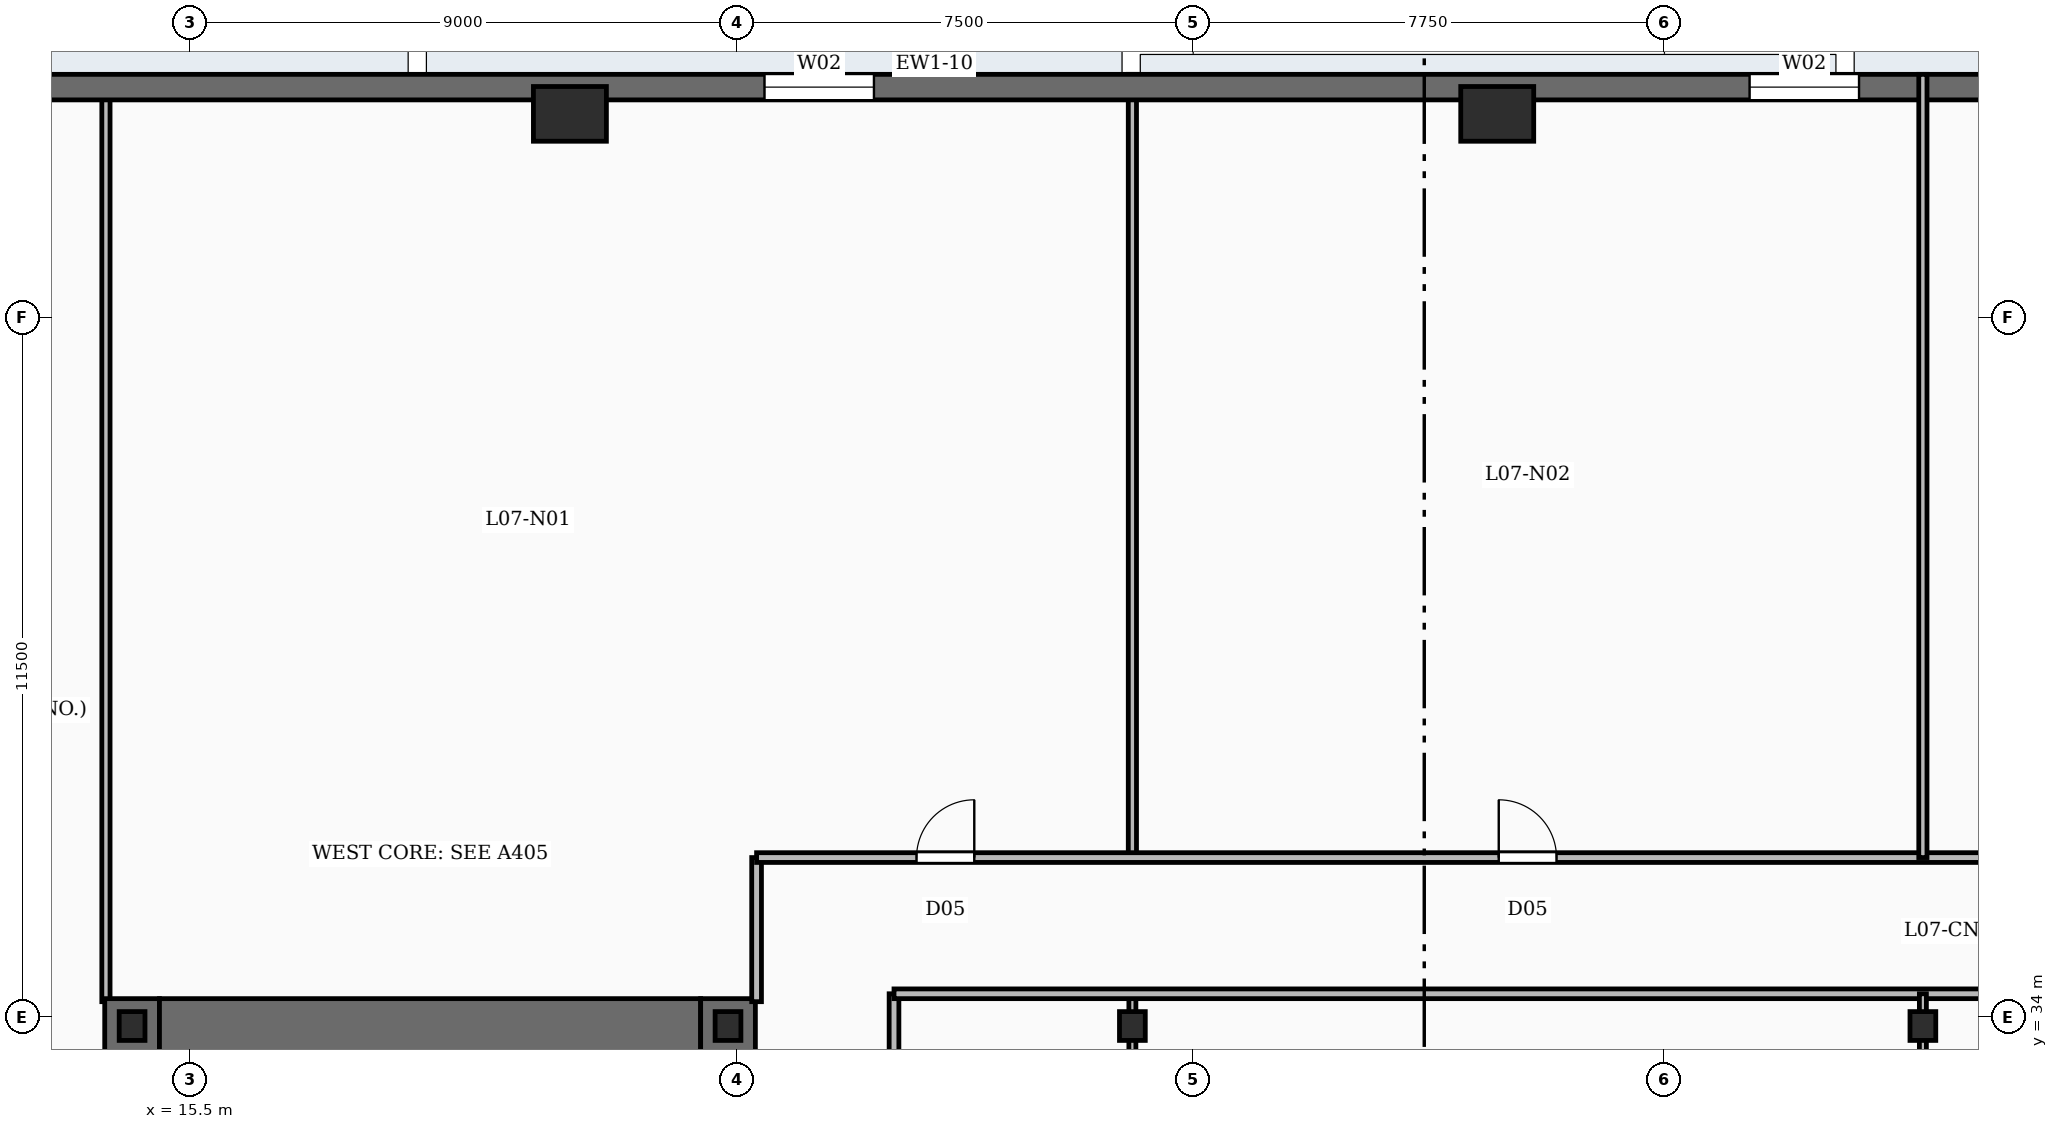
"""IFC4 building model, lengths in metres.
Left out: names, types, materials, properties, quantities, classifications, styles, units other than length and angle.
Written with IfcOpenShell. Run it as: python <this file> out.ifc"""

import sys

from ifc_helpers import new_model, si_unit, direction, frame, frame_2d, origin, origin_2d, place, context, subcontext, project, spatial, rectangle, i_section, extrude, element, fill, save


model = new_model("IFC4")
c1 = context("Model", 3, precision=1e-05, world=origin(), true_north=direction((0.0, 1.0)))
c2 = subcontext(c1, "Body", "Model", "MODEL_VIEW")
j1 = project(units=[si_unit("LENGTHUNIT", "METRE"), si_unit("PLANEANGLEUNIT", "RADIAN")], contexts=[c1])
p1 = place(None, origin())
s1 = spatial("IfcSite", under=j1, at=p1, CompositionType="ELEMENT")
p2 = place(p1, origin())
s2 = spatial("IfcBuilding", under=s1, at=p2, CompositionType="ELEMENT")
p3 = place(p2, frame((0.0, 0.0, 42.0)))
s3 = spatial("IfcBuildingStorey", under=s2, at=p3, CompositionType="ELEMENT", Elevation=42.0)
p4 = place(p3, frame((14.55, 19.0, -0.45), z_axis=(0.0, 0.0, 1.0), x_axis=(0.0, 1.0, 0.0)))
e1 = element("IfcWall", 1, at=p4, inside=s3, PredefinedType="SHEAR", context=c2, shape_type="SweptSolid", body=[
    extrude(rectangle(XDim=15.3, YDim=0.9, at=frame_2d((7.65, 0.0))), origin(), (0.0, 0.0, 1.0), 3.93),
])
p5 = place(p3, frame((24.35, 19.0, -0.45), z_axis=(0.0, 0.0, 1.0), x_axis=(0.0, 1.0, 0.0)))
e2 = element("IfcWall", 2, at=p5, inside=s3, PredefinedType="SHEAR", context=c2, shape_type="SweptSolid", body=[
    extrude(rectangle(XDim=15.3, YDim=0.9, at=frame_2d((7.65, 0.0))), origin(), (0.0, 0.0, 1.0), 3.93),
])
p6 = place(p5, frame((2.5, 0.0, 0.45)))
e3 = element("IfcOpeningElement", 3, at=p6, cuts=e2, PredefinedType="OPENING", context=c2, shape_type="SweptSolid", body=[
    extrude(rectangle(XDim=1.05, YDim=2.15, at=frame_2d((0.525, 1.075))), frame((0.0, 0.46, 0.0), z_axis=(0.0, -1.0, 0.0), x_axis=(1.0, 0.0, 0.0)), (0.0, 0.0, 1.0), 0.92),
])
p7 = place(p5, frame((7.0, 0.0, 0.45)))
e4 = element("IfcOpeningElement", 4, at=p7, cuts=e2, PredefinedType="OPENING", context=c2, shape_type="SweptSolid", body=[
    extrude(rectangle(XDim=1.05, YDim=2.15, at=frame_2d((0.525, 1.075))), frame((0.0, 0.46, 0.0), z_axis=(0.0, -1.0, 0.0), x_axis=(1.0, 0.0, 0.0)), (0.0, 0.0, 1.0), 0.92),
])
p8 = place(p3, frame((15.0, 33.85, -0.45), z_axis=(0.0, 0.0, 1.0), x_axis=(1.0, 0.0, 0.0)))
e5 = element("IfcWall", 5, at=p8, inside=s3, PredefinedType="SHEAR", context=c2, shape_type="SweptSolid", body=[
    extrude(rectangle(XDim=8.9, YDim=0.9, at=frame_2d((4.45, 0.0))), origin(), (0.0, 0.0, 1.0), 3.93),
])
for number, where, z_axis, x_axis in (
    (6, (14.55, 33.85, -0.45), (0.0, 0.0, 1.0), (1.0, 0.0, 0.0)),
    (7, (24.35, 33.85, -0.45), (0.0, 0.0, 1.0), (1.0, 0.0, 0.0)),
    (8, (31.0, 33.85, -0.45), (0.0, 0.0, 1.0), (1.0, 0.0, 0.0)),
    (9, (44.0, 33.85, -0.45), (0.0, 0.0, 1.0), (1.0, 0.0, 0.0)),
):
    element("IfcColumn", number, at=place(p3, frame(where, z_axis=z_axis, x_axis=x_axis)), inside=s3, PredefinedType="COLUMN", context=c2, shape_type="SweptSolid", body=[
        extrude(i_section(OverallWidth=0.424, OverallDepth=0.474, WebThickness=0.048, FlangeThickness=0.077, FilletRadius=0.02, at=origin_2d()), origin(), (0.0, 0.0, 1.0), 3.93),
    ])
for number, where, z_axis, x_axis in (
    (10, (37.0, 48.85, -0.45), (0.0, 0.0, 1.0), (1.0, 0.0, 0.0)),
    (11, (21.75, 48.85, -0.45), (0.0, 0.0, 1.0), (1.0, 0.0, 0.0)),
):
    element("IfcColumn", number, at=place(p3, frame(where, z_axis=z_axis, x_axis=x_axis)), inside=s3, PredefinedType="COLUMN", context=c2, shape_type="SweptSolid", body=[
        extrude(rectangle(XDim=1.2, YDim=0.9, at=origin_2d()), origin(), (0.0, 0.0, 1.0), 3.93),
    ])
p9 = place(p3, frame((6.15, 49.29, 0.0), z_axis=(0.0, 0.0, 1.0), x_axis=(1.0, 0.0, 0.0)))
e12 = element("IfcWall", 12, at=p9, inside=s3, PredefinedType="SOLIDWALL", context=c2, shape_type="SweptSolid", body=[
    extrude(rectangle(XDim=61.7, YDim=0.42, at=frame_2d((30.85, 0.0))), origin(), (0.0, 0.0, 1.0), 3.48),
])
p10 = place(p9, frame((2.6, 0.0, 0.88)))
e13 = element("IfcOpeningElement", 13, at=p10, cuts=e12, PredefinedType="OPENING", context=c2, shape_type="SweptSolid", body=[
    extrude(rectangle(XDim=1.8, YDim=2.15, at=frame_2d((0.9, 1.075))), frame((0.0, 0.22, 0.0), z_axis=(0.0, -1.0, 0.0), x_axis=(1.0, 0.0, 0.0)), (0.0, 0.0, 1.0), 0.44),
])
p11 = place(p9, frame((18.8, 0.0, 0.88)))
e14 = element("IfcOpeningElement", 14, at=p11, cuts=e12, PredefinedType="OPENING", context=c2, shape_type="SweptSolid", body=[
    extrude(rectangle(XDim=1.8, YDim=2.15, at=frame_2d((0.9, 1.075))), frame((0.0, 0.22, 0.0), z_axis=(0.0, -1.0, 0.0), x_axis=(1.0, 0.0, 0.0)), (0.0, 0.0, 1.0), 0.44),
])
p12 = place(p9, frame((35.0, 0.0, 0.88)))
e15 = element("IfcOpeningElement", 15, at=p12, cuts=e12, PredefinedType="OPENING", context=c2, shape_type="SweptSolid", body=[
    extrude(rectangle(XDim=1.8, YDim=2.15, at=frame_2d((0.9, 1.075))), frame((0.0, 0.22, 0.0), z_axis=(0.0, -1.0, 0.0), x_axis=(1.0, 0.0, 0.0)), (0.0, 0.0, 1.0), 0.44),
])
p13 = place(p9, frame((40.4, 0.0, 0.88)))
e16 = element("IfcOpeningElement", 16, at=p13, cuts=e12, PredefinedType="OPENING", context=c2, shape_type="SweptSolid", body=[
    extrude(rectangle(XDim=1.8, YDim=2.15, at=frame_2d((0.9, 1.075))), frame((0.0, 0.22, 0.0), z_axis=(0.0, -1.0, 0.0), x_axis=(1.0, 0.0, 0.0)), (0.0, 0.0, 1.0), 0.44),
])
p14 = place(p9, frame((51.2, 0.0, 0.88)))
e17 = element("IfcOpeningElement", 17, at=p14, cuts=e12, PredefinedType="OPENING", context=c2, shape_type="SweptSolid", body=[
    extrude(rectangle(XDim=1.8, YDim=2.15, at=frame_2d((0.9, 1.075))), frame((0.0, 0.22, 0.0), z_axis=(0.0, -1.0, 0.0), x_axis=(1.0, 0.0, 0.0)), (0.0, 0.0, 1.0), 0.44),
])
p15 = place(p9, frame((56.6, 0.0, 0.88)))
e18 = element("IfcOpeningElement", 18, at=p15, cuts=e12, PredefinedType="OPENING", context=c2, shape_type="SweptSolid", body=[
    extrude(rectangle(XDim=1.8, YDim=2.15, at=frame_2d((0.9, 1.075))), frame((0.0, 0.22, 0.0), z_axis=(0.0, -1.0, 0.0), x_axis=(1.0, 0.0, 0.0)), (0.0, 0.0, 1.0), 0.44),
])
for number, where, z_axis, x_axis in (
    (19, (31.0, 36.62, 0.0), (0.0, 0.0, 1.0), (0.0, 1.0, 0.0)),
    (20, (44.0, 36.62, 0.0), (0.0, 0.0, 1.0), (0.0, 1.0, 0.0)),
):
    element("IfcWall", number, at=place(p3, frame(where, z_axis=z_axis, x_axis=x_axis)), inside=s3, PredefinedType="PARTITIONING", context=c2, shape_type="SweptSolid", body=[
        extrude(rectangle(XDim=12.88, YDim=0.135, at=frame_2d((6.44, 0.0))), origin(), (0.0, 0.0, 1.0), 2.54),
    ])
p16 = place(p3, frame((24.82, 34.25, 0.0), z_axis=(0.0, 0.0, 1.0), x_axis=(0.0, 1.0, 0.0)))
e21 = element("IfcWall", 21, at=p16, inside=s3, PredefinedType="PARTITIONING", context=c2, shape_type="SweptSolid", body=[
    extrude(rectangle(XDim=2.37, YDim=0.16, at=frame_2d((1.185, 0.0))), origin(), (0.0, 0.0, 1.0), 2.54),
])
p17 = place(p3, frame((14.12, 34.25, 0.0), z_axis=(0.0, 0.0, 1.0), x_axis=(0.0, 1.0, 0.0)))
e22 = element("IfcWall", 22, at=p17, inside=s3, PredefinedType="PARTITIONING", context=c2, shape_type="SweptSolid", body=[
    extrude(rectangle(XDim=15.01, YDim=0.135, at=frame_2d((7.505, 0.0))), origin(), (0.0, 0.0, 1.0), 2.54),
])
p18 = place(p3, frame((24.82, 36.62, 0.0), z_axis=(0.0, 0.0, 1.0), x_axis=(1.0, 0.0, 0.0)))
e23 = element("IfcWall", 23, at=p18, inside=s3, PredefinedType="PARTITIONING", context=c2, shape_type="SweptSolid", body=[
    extrude(rectangle(XDim=25.26, YDim=0.16, at=frame_2d((12.63, 0.0))), origin(), (0.0, 0.0, 1.0), 2.54),
])
p19 = place(p18, frame((2.63, 0.0, 0.0)))
e24 = element("IfcOpeningElement", 24, at=p19, cuts=e23, PredefinedType="OPENING", context=c2, shape_type="SweptSolid", body=[
    extrude(rectangle(XDim=0.95, YDim=2.15, at=frame_2d((0.475, 1.075))), frame((0.0, 0.09, 0.0), z_axis=(0.0, -1.0, 0.0), x_axis=(1.0, 0.0, 0.0)), (0.0, 0.0, 1.0), 0.18),
])
p20 = place(p18, frame((12.205, 0.0, 0.0)))
e25 = element("IfcOpeningElement", 25, at=p20, cuts=e23, PredefinedType="OPENING", context=c2, shape_type="SweptSolid", body=[
    extrude(rectangle(XDim=0.95, YDim=2.15, at=frame_2d((0.475, 1.075))), frame((0.0, 0.09, 0.0), z_axis=(0.0, -1.0, 0.0), x_axis=(1.0, 0.0, 0.0)), (0.0, 0.0, 1.0), 0.18),
])
p21 = place(p18, frame((21.73, 0.0, 0.0)))
e26 = element("IfcOpeningElement", 26, at=p21, cuts=e23, PredefinedType="OPENING", context=c2, shape_type="SweptSolid", body=[
    extrude(rectangle(XDim=0.95, YDim=2.15, at=frame_2d((0.475, 1.075))), frame((0.0, 0.09, 0.0), z_axis=(0.0, -1.0, 0.0), x_axis=(1.0, 0.0, 0.0)), (0.0, 0.0, 1.0), 0.18),
])
for number, where, z_axis, x_axis in (
    (27, (31.0, 15.38, 0.0), (0.0, 0.0, 1.0), (0.0, 1.0, 0.0)),
    (28, (44.0, 15.38, 0.0), (0.0, 0.0, 1.0), (0.0, 1.0, 0.0)),
):
    element("IfcWall", number, at=place(p3, frame(where, z_axis=z_axis, x_axis=x_axis)), inside=s3, PredefinedType="PARTITIONING", context=c2, shape_type="SweptSolid", body=[
        extrude(rectangle(XDim=19.0, YDim=0.115, at=frame_2d((9.5, 0.0))), origin(), (0.0, 0.0, 1.0), 2.54),
    ])
p22 = place(p3, frame((27.08, 34.38, 0.0), z_axis=(0.0, 0.0, 1.0), x_axis=(1.0, 0.0, 0.0)))
e29 = element("IfcWall", 29, at=p22, inside=s3, PredefinedType="PARTITIONING", context=c2, shape_type="SweptSolid", body=[
    extrude(rectangle(XDim=20.74, YDim=0.16, at=frame_2d((10.37, 0.0))), origin(), (0.0, 0.0, 1.0), 2.54),
])
p23 = place(p3, frame((27.08, 15.38, 0.0), z_axis=(0.0, 0.0, 1.0), x_axis=(0.0, 1.0, 0.0)))
e30 = element("IfcWall", 30, at=p23, inside=s3, PredefinedType="PARTITIONING", context=c2, shape_type="SweptSolid", body=[
    extrude(rectangle(XDim=19.0, YDim=0.16, at=frame_2d((9.5, 0.0))), origin(), (0.0, 0.0, 1.0), 2.54),
])
p24 = place(p11, origin())
e31 = element("IfcWindow", 31, at=p24, inside=s3, PartitioningType="DOUBLE_PANEL_VERTICAL", PredefinedType="WINDOW", context=c2, shape_type="SweptSolid", body=[
    extrude(rectangle(XDim=1.8, YDim=2.15, at=frame_2d((0.9, 1.075))), frame((0.0, 0.03, 0.0), z_axis=(0.0, -1.0, 0.0), x_axis=(1.0, 0.0, 0.0)), (0.0, 0.0, 1.0), 0.06),
])
fill(e14, e31)
p25 = place(p12, origin())
e32 = element("IfcWindow", 32, at=p25, inside=s3, PartitioningType="DOUBLE_PANEL_VERTICAL", PredefinedType="WINDOW", context=c2, shape_type="SweptSolid", body=[
    extrude(rectangle(XDim=1.8, YDim=2.15, at=frame_2d((0.9, 1.075))), frame((0.0, 0.03, 0.0), z_axis=(0.0, -1.0, 0.0), x_axis=(1.0, 0.0, 0.0)), (0.0, 0.0, 1.0), 0.06),
])
fill(e15, e32)
p26 = place(p19, origin())
e33 = element("IfcDoor", 33, at=p26, inside=s3, OperationType="SINGLE_SWING_RIGHT", PredefinedType="DOOR", context=c2, shape_type="SweptSolid", body=[
    extrude(rectangle(XDim=0.95, YDim=2.15, at=frame_2d((0.475, 1.075))), frame((0.0, 0.025, 0.0), z_axis=(0.0, -1.0, 0.0), x_axis=(1.0, 0.0, 0.0)), (0.0, 0.0, 1.0), 0.05),
])
fill(e24, e33)
p27 = place(p20, origin())
e34 = element("IfcDoor", 34, at=p27, inside=s3, OperationType="SINGLE_SWING_LEFT", PredefinedType="DOOR", context=c2, shape_type="SweptSolid", body=[
    extrude(rectangle(XDim=0.95, YDim=2.15, at=frame_2d((0.475, 1.075))), frame((0.0, 0.025, 0.0), z_axis=(0.0, -1.0, 0.0), x_axis=(1.0, 0.0, 0.0)), (0.0, 0.0, 1.0), 0.05),
])
fill(e25, e34)
save(model, sys.argv[1])
